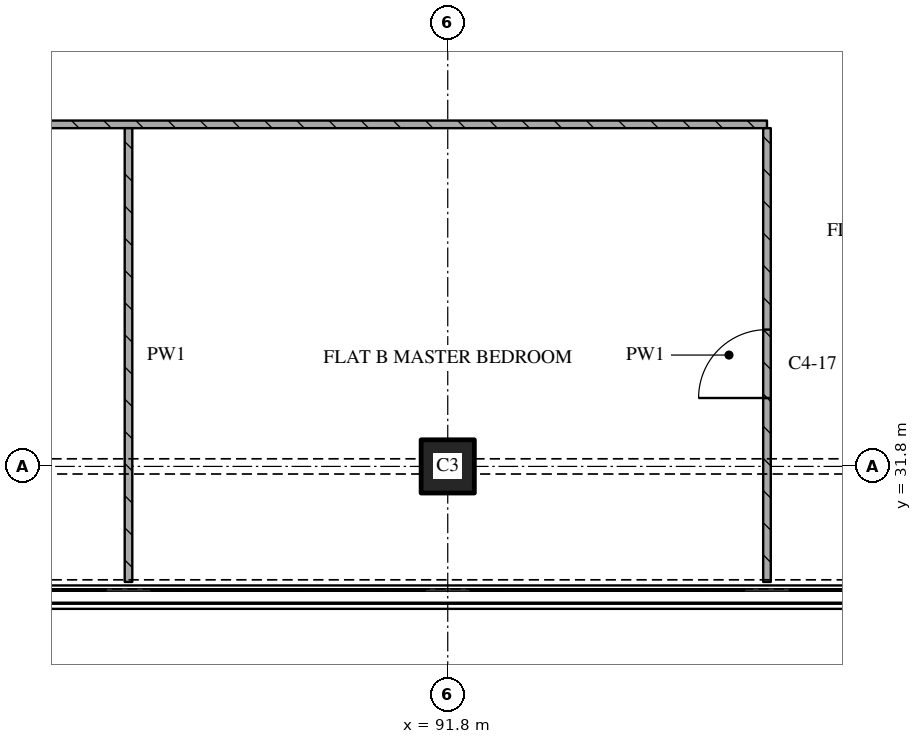
"""IFC4 building model, lengths in metres.
Left out: names, types, materials, properties, quantities, classifications, styles, units other than length and angle.
Written with IfcOpenShell. Run it as: python <this file> out.ifc"""

import sys

from ifc_helpers import new_model, si_unit, direction, frame, frame_2d, origin, origin_2d, place, context, subcontext, project, spatial, rectangle, extrude, element, fill, save


model = new_model("IFC4")
c1 = context("Model", 3, precision=1e-05, world=origin(), true_north=direction((0.0, 1.0)))
c2 = subcontext(c1, "Body", "Model", "MODEL_VIEW")
j1 = project(units=[si_unit("LENGTHUNIT", "METRE"), si_unit("PLANEANGLEUNIT", "RADIAN")], contexts=[c1])
p1 = place(None, origin())
s1 = spatial("IfcSite", under=j1, at=p1, CompositionType="ELEMENT")
p2 = place(p1, origin())
s2 = spatial("IfcBuilding", under=s1, at=p2, CompositionType="ELEMENT")
p3 = place(p2, frame((0.0, 0.0, 179.85)))
s3 = spatial("IfcBuildingStorey", under=s2, at=p3, CompositionType="ELEMENT", Elevation=179.85)
p4 = place(p3, frame((91.8, 31.8, 0.0), z_axis=(0.0, 0.0, 1.0), x_axis=(1.0, 0.0, 0.0)))
e1 = element("IfcColumn", 1, at=p4, inside=s3, PredefinedType="COLUMN", context=c2, shape_type="SweptSolid", body=[
    extrude(rectangle(XDim=0.7, YDim=0.7, at=origin_2d()), origin(), (0.0, 0.0, 1.0), 3.6),
])
p5 = place(p3, frame((96.0, 36.3, 0.0), z_axis=(0.0, 0.0, 1.0), x_axis=(-1.0, 0.0, 0.0)))
e2 = element("IfcWall", 2, at=p5, inside=s3, PredefinedType="PARTITIONING", context=c2, shape_type="SweptSolid", body=[
    extrude(rectangle(XDim=20.9, YDim=0.1, at=frame_2d((10.45, 0.0))), origin(), (0.0, 0.0, 1.0), 3.32),
])
p6 = place(p5, frame((12.15, 0.0, 0.0)))
e3 = element("IfcOpeningElement", 3, at=p6, cuts=e2, PredefinedType="OPENING", context=c2, shape_type="SweptSolid", body=[
    extrude(rectangle(XDim=0.9, YDim=2.1, at=frame_2d((0.45, 1.05))), frame((0.0, 0.06, 0.0), z_axis=(0.0, -1.0, 0.0), x_axis=(1.0, 0.0, 0.0)), (0.0, 0.0, 1.0), 0.12),
])
p7 = place(p5, frame((18.45, 0.0, 0.0)))
e4 = element("IfcOpeningElement", 4, at=p7, cuts=e2, PredefinedType="OPENING", context=c2, shape_type="SweptSolid", body=[
    extrude(rectangle(XDim=0.9, YDim=2.1, at=frame_2d((0.45, 1.05))), frame((0.0, 0.06, 0.0), z_axis=(0.0, -1.0, 0.0), x_axis=(1.0, 0.0, 0.0)), (0.0, 0.0, 1.0), 0.12),
])
p8 = place(p3, frame((87.6, 36.25, 0.0), z_axis=(0.0, 0.0, 1.0), x_axis=(0.0, -1.0, 0.0)))
e5 = element("IfcWall", 5, at=p8, inside=s3, PredefinedType="PARTITIONING", context=c2, shape_type="SweptSolid", body=[
    extrude(rectangle(XDim=5.97, YDim=0.1, at=frame_2d((2.985, 0.0))), origin(), (0.0, 0.0, 1.0), 3.32),
])
p9 = place(p3, frame((96.0, 30.28, 0.0), z_axis=(0.0, 0.0, 1.0), x_axis=(0.0, 1.0, 0.0)))
e6 = element("IfcWall", 6, at=p9, inside=s3, PredefinedType="PARTITIONING", context=c2, shape_type="SweptSolid", body=[
    extrude(rectangle(XDim=5.97, YDim=0.1, at=frame_2d((2.985, 0.0))), origin(), (0.0, 0.0, 1.0), 3.32),
])
p10 = place(p9, frame((2.42, 0.0, 0.0)))
e7 = element("IfcOpeningElement", 7, at=p10, cuts=e6, PredefinedType="OPENING", context=c2, shape_type="SweptSolid", body=[
    extrude(rectangle(XDim=0.9, YDim=2.1, at=frame_2d((0.45, 1.05))), frame((0.0, 0.06, 0.0), z_axis=(0.0, -1.0, 0.0), x_axis=(1.0, 0.0, 0.0)), (0.0, 0.0, 1.0), 0.12),
])
p11 = place(p10, origin())
e8 = element("IfcDoor", 8, at=p11, inside=s3, OperationType="SINGLE_SWING_LEFT", PredefinedType="DOOR", context=c2, shape_type="SweptSolid", body=[
    extrude(rectangle(XDim=0.9, YDim=2.1, at=frame_2d((0.45, 1.05))), frame((0.0, 0.025, 0.0), z_axis=(0.0, -1.0, 0.0), x_axis=(1.0, 0.0, 0.0)), (0.0, 0.0, 1.0), 0.05),
])
fill(e7, e8)
save(model, sys.argv[1])
